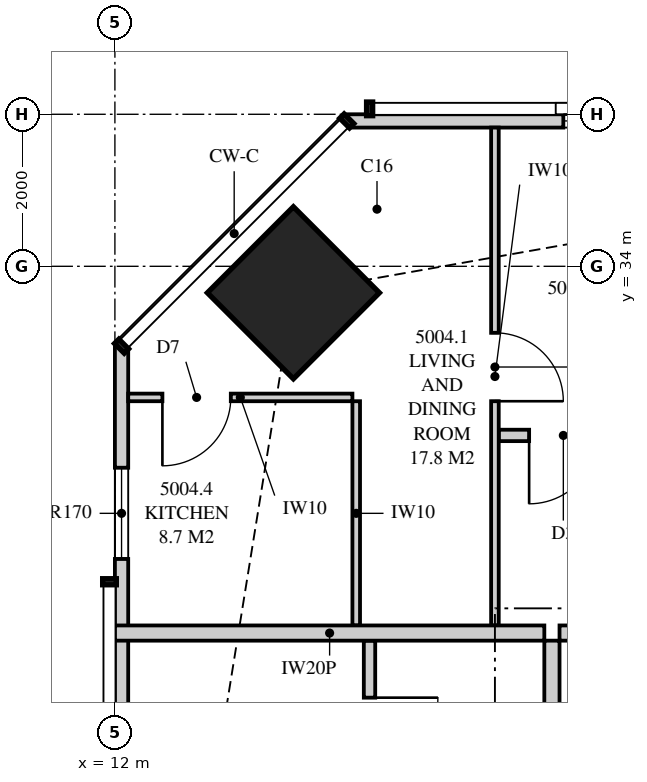
"""IFC4 building model, lengths in metres.
Left out: names, types, materials, properties, quantities, classifications, styles, units other than length and angle.
Written with IfcOpenShell. Run it as: python <this file> out.ifc"""

import sys

from ifc_helpers import new_model, si_unit, direction, frame, frame_2d, origin, origin_2d, place, context, subcontext, project, spatial, polyline, rectangle, outline, extrude, element, fill, save


model = new_model("IFC4")
c1 = context("Model", 3, precision=1e-05, world=origin(), true_north=direction((0.0, 1.0)))
c2 = subcontext(c1, "Body", "Model", "MODEL_VIEW")
j1 = project(units=[si_unit("LENGTHUNIT", "METRE"), si_unit("PLANEANGLEUNIT", "RADIAN")], contexts=[c1])
p1 = place(None, origin())
s1 = spatial("IfcSite", under=j1, at=p1, CompositionType="ELEMENT")
p2 = place(p1, origin())
s2 = spatial("IfcBuilding", under=s1, at=p2, CompositionType="ELEMENT")
p3 = place(p2, frame((0.0, 0.0, 184.5)))
s3 = spatial("IfcBuildingStorey", under=s2, at=p3, CompositionType="ELEMENT", Elevation=184.5)
p4 = place(p3, frame((14.348, 33.652, 0.0), z_axis=(0.0, 0.0, 1.0), x_axis=(0.707106781187, 0.707106781187, 0.0)))
e1 = element("IfcColumn", 1, at=p4, inside=s3, PredefinedType="COLUMN", context=c2, shape_type="SweptSolid", body=[
    extrude(rectangle(XDim=1.6, YDim=1.6, at=origin_2d()), origin(), (0.0, 0.0, 1.0), 3.35),
])
p5 = place(p3, frame((49.949, 35.913, 0.0), z_axis=(0.0, 0.0, 1.0), x_axis=(-1.0, 0.0, 0.0)))
e2 = element("IfcWall", 2, at=p5, inside=s3, PredefinedType="SOLIDWALL", context=c2, shape_type="SweptSolid", body=[
    extrude(outline(polyline([(0.0, 0.0), (34.897, 0.0), (34.897, 3.11), (27.91, 3.11), (27.91, 2.15), (27.836, 2.15), (27.836, 3.11), (27.699, 3.11), (27.699, 2.15), (7.199, 2.15), (7.199, 3.11), (7.062, 3.11), (7.062, 2.15), (6.987, 2.15), (6.987, 3.11), (0.0, 3.11), (0.0, 0.0)])), frame((0.0, 0.087, 0.0), z_axis=(0.0, -1.0, 0.0), x_axis=(1.0, 0.0, 0.0)), (0.0, 0.0, 1.0), 0.175),
])
p6 = place(p5, frame((2.75, 0.0, 0.4)))
e3 = element("IfcOpeningElement", 3, at=p6, cuts=e2, PredefinedType="OPENING", context=c2, shape_type="SweptSolid", body=[
    extrude(rectangle(XDim=2.4, YDim=1.7, at=frame_2d((1.2, 0.85))), frame((0.0, 0.097, 0.0), z_axis=(0.0, -1.0, 0.0), x_axis=(1.0, 0.0, 0.0)), (0.0, 0.0, 1.0), 0.195),
])
p7 = place(p5, frame((9.124, 0.0, 0.4)))
e4 = element("IfcOpeningElement", 4, at=p7, cuts=e2, PredefinedType="OPENING", context=c2, shape_type="SweptSolid", body=[
    extrude(rectangle(XDim=1.8, YDim=1.7, at=frame_2d((0.9, 0.85))), frame((0.0, 0.097, 0.0), z_axis=(0.0, -1.0, 0.0), x_axis=(1.0, 0.0, 0.0)), (0.0, 0.0, 1.0), 0.195),
])
p8 = place(p5, frame((13.174, 0.0, 0.0)))
e5 = element("IfcOpeningElement", 5, at=p8, cuts=e2, PredefinedType="OPENING", context=c2, shape_type="SweptSolid", body=[
    extrude(rectangle(XDim=1.8, YDim=2.1, at=frame_2d((0.9, 1.05))), frame((0.0, 0.097, 0.0), z_axis=(0.0, -1.0, 0.0), x_axis=(1.0, 0.0, 0.0)), (0.0, 0.0, 1.0), 0.195),
])
p9 = place(p5, frame((19.849, 0.0, 0.4)))
e6 = element("IfcOpeningElement", 6, at=p9, cuts=e2, PredefinedType="OPENING", context=c2, shape_type="SweptSolid", body=[
    extrude(rectangle(XDim=1.8, YDim=1.7, at=frame_2d((0.9, 0.85))), frame((0.0, 0.097, 0.0), z_axis=(0.0, -1.0, 0.0), x_axis=(1.0, 0.0, 0.0)), (0.0, 0.0, 1.0), 0.195),
])
p10 = place(p5, frame((23.304, 0.0, 0.4)))
e7 = element("IfcOpeningElement", 7, at=p10, cuts=e2, PredefinedType="OPENING", context=c2, shape_type="SweptSolid", body=[
    extrude(rectangle(XDim=2.4, YDim=1.7, at=frame_2d((1.2, 0.85))), frame((0.0, 0.097, 0.0), z_axis=(0.0, -1.0, 0.0), x_axis=(1.0, 0.0, 0.0)), (0.0, 0.0, 1.0), 0.195),
])
p11 = place(p5, frame((30.249, 0.0, 0.4)))
e8 = element("IfcOpeningElement", 8, at=p11, cuts=e2, PredefinedType="OPENING", context=c2, shape_type="SweptSolid", body=[
    extrude(rectangle(XDim=1.8, YDim=1.7, at=frame_2d((0.9, 0.85))), frame((0.0, 0.097, 0.0), z_axis=(0.0, -1.0, 0.0), x_axis=(1.0, 0.0, 0.0)), (0.0, 0.0, 1.0), 0.195),
])
p12 = place(p3, frame((12.087, 32.949, 0.0), z_axis=(0.0, 0.0, 1.0), x_axis=(0.0, -1.0, 0.0)))
e9 = element("IfcWall", 9, at=p12, inside=s3, PredefinedType="SOLIDWALL", context=c2, shape_type="SweptSolid", body=[
    extrude(outline(polyline([(0.0, 0.0), (29.897, 0.0), (29.897, 3.11), (20.191, 3.11), (20.191, 2.15), (20.051, 2.15), (20.051, 3.11), (19.949, 3.11), (19.949, 2.15), (7.949, 2.15), (7.949, 3.11), (7.823, 3.11), (7.823, 2.15), (7.73, 2.15), (7.73, 3.11), (0.0, 3.11), (0.0, 0.0)])), frame((0.0, 0.087, 0.0), z_axis=(0.0, -1.0, 0.0), x_axis=(1.0, 0.0, 0.0)), (0.0, 0.0, 1.0), 0.175),
])
p13 = place(p12, frame((1.599, 0.0, 0.4)))
e10 = element("IfcOpeningElement", 10, at=p13, cuts=e9, PredefinedType="OPENING", context=c2, shape_type="SweptSolid", body=[
    extrude(rectangle(XDim=1.2, YDim=1.7, at=frame_2d((0.6, 0.85))), frame((0.0, 0.097, 0.0), z_axis=(0.0, -1.0, 0.0), x_axis=(1.0, 0.0, 0.0)), (0.0, 0.0, 1.0), 0.195),
])
p14 = place(p12, frame((9.899, 0.0, 0.4)))
e11 = element("IfcOpeningElement", 11, at=p14, cuts=e9, PredefinedType="OPENING", context=c2, shape_type="SweptSolid", body=[
    extrude(rectangle(XDim=1.8, YDim=1.7, at=frame_2d((0.9, 0.85))), frame((0.0, 0.097, 0.0), z_axis=(0.0, -1.0, 0.0), x_axis=(1.0, 0.0, 0.0)), (0.0, 0.0, 1.0), 0.195),
])
p15 = place(p12, frame((13.024, 0.0, 0.4)))
e12 = element("IfcOpeningElement", 12, at=p15, cuts=e9, PredefinedType="OPENING", context=c2, shape_type="SweptSolid", body=[
    extrude(rectangle(XDim=1.8, YDim=1.7, at=frame_2d((0.9, 0.85))), frame((0.0, 0.097, 0.0), z_axis=(0.0, -1.0, 0.0), x_axis=(1.0, 0.0, 0.0)), (0.0, 0.0, 1.0), 0.195),
])
p16 = place(p12, frame((16.201, 0.0, 0.4)))
e13 = element("IfcOpeningElement", 13, at=p16, cuts=e9, PredefinedType="OPENING", context=c2, shape_type="SweptSolid", body=[
    extrude(rectangle(XDim=1.8, YDim=1.7, at=frame_2d((0.9, 0.85))), frame((0.0, 0.097, 0.0), z_axis=(0.0, -1.0, 0.0), x_axis=(1.0, 0.0, 0.0)), (0.0, 0.0, 1.0), 0.195),
])
p17 = place(p12, frame((22.624, 0.0, 0.0)))
e14 = element("IfcOpeningElement", 14, at=p17, cuts=e9, PredefinedType="OPENING", context=c2, shape_type="SweptSolid", body=[
    extrude(rectangle(XDim=1.8, YDim=2.1, at=frame_2d((0.9, 1.05))), frame((0.0, 0.097, 0.0), z_axis=(0.0, -1.0, 0.0), x_axis=(1.0, 0.0, 0.0)), (0.0, 0.0, 1.0), 0.195),
])
p18 = place(p3, frame((17.85, 29.175, 0.0), z_axis=(0.0, 0.0, 1.0), x_axis=(1.0, 0.0, 0.0)))
e15 = element("IfcWall", 15, at=p18, inside=s3, PredefinedType="PARTITIONING", context=c2, shape_type="SweptSolid", body=[
    extrude(rectangle(XDim=2.65, YDim=0.2, at=frame_2d((1.325, 0.0))), origin(), (0.0, 0.0, 1.0), 3.11),
])
p19 = place(p18, frame((0.2, 0.0, 0.0)))
e16 = element("IfcOpeningElement", 16, at=p19, cuts=e15, PredefinedType="OPENING", context=c2, shape_type="SweptSolid", body=[
    extrude(rectangle(XDim=1.05, YDim=2.2, at=frame_2d((0.525, 1.1))), frame((0.0, 0.11, 0.0), z_axis=(0.0, -1.0, 0.0), x_axis=(1.0, 0.0, 0.0)), (0.0, 0.0, 1.0), 0.22),
])
p20 = place(p3, frame((17.0, 35.825, 0.0), z_axis=(0.0, 0.0, 1.0), x_axis=(0.0, -1.0, 0.0)))
e17 = element("IfcWall", 17, at=p20, inside=s3, PredefinedType="PARTITIONING", context=c2, shape_type="SweptSolid", body=[
    extrude(outline(polyline([(0.0, 0.0), (6.55, 0.0), (6.55, 3.11), (2.578, 3.11), (2.578, 2.15), (0.831, 2.15), (0.831, 3.11), (0.0, 3.11), (0.0, 0.0)])), frame((0.0, 0.05, 0.0), z_axis=(0.0, -1.0, 0.0), x_axis=(1.0, 0.0, 0.0)), (0.0, 0.0, 1.0), 0.1),
])
p21 = place(p20, frame((2.7, 0.0, 0.0)))
e18 = element("IfcOpeningElement", 18, at=p21, cuts=e17, PredefinedType="OPENING", context=c2, shape_type="SweptSolid", body=[
    extrude(rectangle(XDim=0.9, YDim=2.1, at=frame_2d((0.45, 1.05))), frame((0.0, 0.06, 0.0), z_axis=(0.0, -1.0, 0.0), x_axis=(1.0, 0.0, 0.0)), (0.0, 0.0, 1.0), 0.12),
])
p22 = place(p3, frame((17.05, 31.775, 0.0), z_axis=(0.0, 0.0, 1.0), x_axis=(1.0, 0.0, 0.0)))
e19 = element("IfcWall", 19, at=p22, inside=s3, PredefinedType="PLUMBINGWALL", context=c2, shape_type="SweptSolid", body=[
    extrude(rectangle(XDim=3.45, YDim=0.15, at=frame_2d((1.725, 0.0))), origin(), (0.0, 0.0, 1.0), 3.11),
])
p23 = place(p22, frame((0.4, 0.0, 0.0)))
e20 = element("IfcOpeningElement", 20, at=p23, cuts=e19, PredefinedType="OPENING", context=c2, shape_type="SweptSolid", body=[
    extrude(rectangle(XDim=0.9, YDim=2.1, at=frame_2d((0.45, 1.05))), frame((0.0, 0.085, 0.0), z_axis=(0.0, -1.0, 0.0), x_axis=(1.0, 0.0, 0.0)), (0.0, 0.0, 1.0), 0.17),
])
p24 = place(p3, frame((12.175, 32.275, 0.0), z_axis=(0.0, 0.0, 1.0), x_axis=(1.0, 0.0, 0.0)))
e21 = element("IfcWall", 21, at=p24, inside=s3, PredefinedType="PARTITIONING", context=c2, shape_type="SweptSolid", body=[
    extrude(outline(polyline([(0.0, 0.0), (2.95, 0.0), (2.95, 3.11), (2.822, 3.11), (2.822, 2.15), (1.08, 2.15), (1.08, 3.11), (0.0, 3.11), (0.0, 0.0)])), frame((0.0, 0.05, 0.0), z_axis=(0.0, -1.0, 0.0), x_axis=(1.0, 0.0, 0.0)), (0.0, 0.0, 1.0), 0.1),
])
p25 = place(p24, frame((0.45, 0.0, 0.0)))
e22 = element("IfcOpeningElement", 22, at=p25, cuts=e21, PredefinedType="OPENING", context=c2, shape_type="SweptSolid", body=[
    extrude(rectangle(XDim=0.9, YDim=2.1, at=frame_2d((0.45, 1.05))), frame((0.0, 0.06, 0.0), z_axis=(0.0, -1.0, 0.0), x_axis=(1.0, 0.0, 0.0)), (0.0, 0.0, 1.0), 0.12),
])
p26 = place(p3, frame((15.175, 32.225, 0.0), z_axis=(0.0, 0.0, 1.0), x_axis=(0.0, -1.0, 0.0)))
e23 = element("IfcWall", 23, at=p26, inside=s3, PredefinedType="PARTITIONING", context=c2, shape_type="SweptSolid", body=[
    extrude(rectangle(XDim=2.95, YDim=0.1, at=frame_2d((1.475, 0.0))), origin(), (0.0, 0.0, 1.0), 3.11),
])
p27 = place(p3, frame((12.0, 29.175, 0.0), z_axis=(0.0, 0.0, 1.0), x_axis=(1.0, 0.0, 0.0)))
e24 = element("IfcWall", 24, at=p27, inside=s3, PredefinedType="PARTITIONING", context=c2, shape_type="SweptSolid", body=[
    extrude(outline(polyline([(0.0, 0.0), (5.65, 0.0), (5.65, 3.11), (2.547, 3.11), (2.547, 2.15), (0.703, 2.15), (0.703, 3.11), (0.0, 3.11), (0.0, 0.0)])), frame((0.0, 0.1, 0.0), z_axis=(0.0, -1.0, 0.0), x_axis=(1.0, 0.0, 0.0)), (0.0, 0.0, 1.0), 0.2),
])
p28 = place(p3, frame((17.75, 7.925, 0.0), z_axis=(0.0, 0.0, 1.0), x_axis=(0.0, 1.0, 0.0)))
e25 = element("IfcWall", 25, at=p28, inside=s3, PredefinedType="PARTITIONING", context=c2, shape_type="SweptSolid", body=[
    extrude(outline(polyline([(0.0, 0.0), (21.15, 0.0), (21.15, 3.11), (17.412, 3.11), (17.412, 2.541), (16.738, 2.541), (16.738, 3.11), (5.412, 3.11), (5.412, 2.541), (4.738, 2.541), (4.738, 3.11), (0.0, 3.11), (0.0, 0.0)])), frame((0.0, 0.1, 0.0), z_axis=(0.0, -1.0, 0.0), x_axis=(1.0, 0.0, 0.0)), (0.0, 0.0, 1.0), 0.2),
])
p29 = place(p28, frame((16.25, 0.0, 0.0)))
e26 = element("IfcOpeningElement", 26, at=p29, cuts=e25, PredefinedType="OPENING", context=c2, shape_type="SweptSolid", body=[
    extrude(rectangle(XDim=1.05, YDim=2.2, at=frame_2d((0.525, 1.1))), frame((0.0, 0.11, 0.0), z_axis=(0.0, -1.0, 0.0), x_axis=(1.0, 0.0, 0.0)), (0.0, 0.0, 1.0), 0.22),
])
p30 = place(p3, frame((15.35, 26.65, 0.0), z_axis=(0.0, 0.0, 1.0), x_axis=(0.0, 1.0, 0.0)))
e27 = element("IfcWall", 27, at=p30, inside=s3, PredefinedType="PLUMBINGWALL", context=c2, shape_type="SweptSolid", body=[
    extrude(rectangle(XDim=2.425, YDim=0.15, at=frame_2d((1.212, 0.0))), origin(), (0.0, 0.0, 1.0), 3.11),
])
p31 = place(p30, frame((0.775, 0.0, 0.0)))
e28 = element("IfcOpeningElement", 28, at=p31, cuts=e27, PredefinedType="OPENING", context=c2, shape_type="SweptSolid", body=[
    extrude(rectangle(XDim=0.9, YDim=2.1, at=frame_2d((0.45, 1.05))), frame((0.0, 0.085, 0.0), z_axis=(0.0, -1.0, 0.0), x_axis=(1.0, 0.0, 0.0)), (0.0, 0.0, 1.0), 0.17),
])
p32 = place(p11, origin())
e29 = element("IfcWindow", 29, at=p32, inside=s3, PartitioningType="SINGLE_PANEL", PredefinedType="WINDOW", context=c2, shape_type="SweptSolid", body=[
    extrude(rectangle(XDim=1.8, YDim=1.7, at=frame_2d((0.9, 0.85))), frame((0.0, 0.03, 0.0), z_axis=(0.0, -1.0, 0.0), x_axis=(1.0, 0.0, 0.0)), (0.0, 0.0, 1.0), 0.06),
])
fill(e8, e29)
p33 = place(p13, origin())
e30 = element("IfcWindow", 30, at=p33, inside=s3, PartitioningType="SINGLE_PANEL", PredefinedType="WINDOW", context=c2, shape_type="SweptSolid", body=[
    extrude(rectangle(XDim=1.2, YDim=1.7, at=frame_2d((0.6, 0.85))), frame((0.0, 0.03, 0.0), z_axis=(0.0, -1.0, 0.0), x_axis=(1.0, 0.0, 0.0)), (0.0, 0.0, 1.0), 0.06),
])
fill(e10, e30)
p34 = place(p21, origin())
e31 = element("IfcDoor", 31, at=p34, inside=s3, OperationType="SINGLE_SWING_RIGHT", PredefinedType="DOOR", context=c2, shape_type="SweptSolid", body=[
    extrude(rectangle(XDim=0.9, YDim=2.1, at=frame_2d((0.45, 1.05))), frame((0.0, 0.025, 0.0), z_axis=(0.0, -1.0, 0.0), x_axis=(1.0, 0.0, 0.0)), (0.0, 0.0, 1.0), 0.05),
])
fill(e18, e31)
p35 = place(p23, frame((0.9, 0.0, 0.0), z_axis=(0.0, 0.0, 1.0), x_axis=(-1.0, 0.0, 0.0)))
e32 = element("IfcDoor", 32, at=p35, inside=s3, OperationType="SINGLE_SWING_RIGHT", PredefinedType="DOOR", context=c2, shape_type="SweptSolid", body=[
    extrude(rectangle(XDim=0.9, YDim=2.1, at=frame_2d((0.45, 1.05))), frame((0.0, 0.025, 0.0), z_axis=(0.0, -1.0, 0.0), x_axis=(1.0, 0.0, 0.0)), (0.0, 0.0, 1.0), 0.05),
])
fill(e20, e32)
p36 = place(p25, frame((0.9, 0.0, 0.0), z_axis=(0.0, 0.0, 1.0), x_axis=(-1.0, 0.0, 0.0)))
e33 = element("IfcDoor", 33, at=p36, inside=s3, OperationType="SINGLE_SWING_RIGHT", PredefinedType="DOOR", context=c2, shape_type="SweptSolid", body=[
    extrude(rectangle(XDim=0.9, YDim=2.1, at=frame_2d((0.45, 1.05))), frame((0.0, 0.025, 0.0), z_axis=(0.0, -1.0, 0.0), x_axis=(1.0, 0.0, 0.0)), (0.0, 0.0, 1.0), 0.05),
])
fill(e22, e33)
p37 = place(p31, frame((0.9, 0.0, 0.0), z_axis=(0.0, 0.0, 1.0), x_axis=(-1.0, 0.0, 0.0)))
e34 = element("IfcDoor", 34, at=p37, inside=s3, OperationType="SINGLE_SWING_LEFT", PredefinedType="DOOR", context=c2, shape_type="SweptSolid", body=[
    extrude(rectangle(XDim=0.9, YDim=2.1, at=frame_2d((0.45, 1.05))), frame((0.0, 0.025, 0.0), z_axis=(0.0, -1.0, 0.0), x_axis=(1.0, 0.0, 0.0)), (0.0, 0.0, 1.0), 0.05),
])
fill(e28, e34)
save(model, sys.argv[1])
